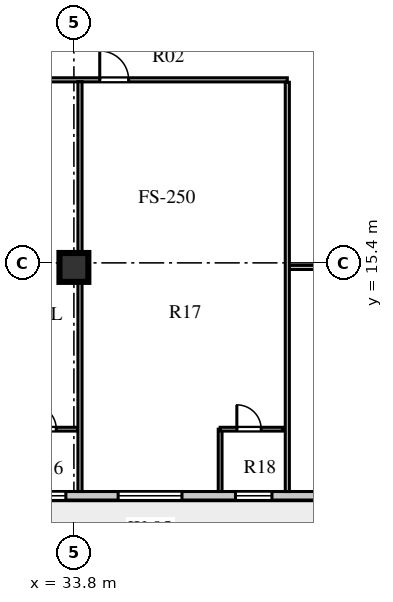
"""IFC4 building model, lengths in metres.
Left out: names, types, materials, properties, quantities, classifications, styles, units other than length and angle.
Written with IfcOpenShell. Run it as: python <this file> out.ifc"""

import sys

from ifc_helpers import new_model, si_unit, direction, frame, frame_2d, origin, origin_2d, place, context, subcontext, project, spatial, rectangle, extrude, element, fill, save


model = new_model("IFC4")
c1 = context("Model", 3, precision=1e-05, world=origin(), true_north=direction((0.0, 1.0)))
c2 = subcontext(c1, "Body", "Model", "MODEL_VIEW")
j1 = project(units=[si_unit("LENGTHUNIT", "METRE"), si_unit("PLANEANGLEUNIT", "RADIAN")], contexts=[c1])
p1 = place(None, origin())
s1 = spatial("IfcSite", under=j1, at=p1, CompositionType="ELEMENT")
p2 = place(p1, origin())
s2 = spatial("IfcBuilding", under=s1, at=p2, CompositionType="ELEMENT")
p3 = place(p2, frame((0.0, 0.0, 188.7)))
s3 = spatial("IfcBuildingStorey", under=s2, at=p3, CompositionType="ELEMENT", Elevation=188.7)
p4 = place(p3, frame((33.8, 15.25, 0.0), z_axis=(0.0, 0.0, 1.0), x_axis=(1.0, 0.0, 0.0)))
e1 = element("IfcColumn", 1, at=p4, inside=s3, PredefinedType="COLUMN", context=c2, shape_type="SweptSolid", body=[
    extrude(rectangle(XDim=0.95, YDim=0.95, at=origin_2d()), origin(), (0.0, 0.0, 1.0), 3.6),
])
p5 = place(p3, frame((13.05, 7.74, 0.0), z_axis=(0.0, 0.0, 1.0), x_axis=(1.0, 0.0, 0.0)))
e2 = element("IfcWall", 2, at=p5, inside=s3, PredefinedType="STANDARD", context=c2, shape_type="SweptSolid", body=[
    extrude(rectangle(XDim=32.5, YDim=0.28, at=frame_2d((16.25, 0.0))), origin(), (0.0, 0.0, 1.0), 3.6),
])
p6 = place(p5, frame((0.95, 0.0, 0.0)))
e3 = element("IfcOpeningElement", 3, at=p6, cuts=e2, PredefinedType="OPENING", context=c2, shape_type="SweptSolid", body=[
    extrude(rectangle(XDim=1.0, YDim=2.05, at=frame_2d((0.5, 1.025))), frame((0.0, 0.15, 0.0), z_axis=(0.0, -1.0, 0.0), x_axis=(1.0, 0.0, 0.0)), (0.0, 0.0, 1.0), 0.3),
])
p7 = place(p5, frame((6.28, 0.0, 0.8)))
e4 = element("IfcOpeningElement", 4, at=p7, cuts=e2, PredefinedType="OPENING", context=c2, shape_type="SweptSolid", body=[
    extrude(rectangle(XDim=1.5, YDim=2.0, at=frame_2d((0.75, 1.0))), frame((0.0, 0.15, 0.0), z_axis=(0.0, -1.0, 0.0), x_axis=(1.0, 0.0, 0.0)), (0.0, 0.0, 1.0), 0.3),
])
p8 = place(p5, frame((14.895, 0.0, 0.8)))
e5 = element("IfcOpeningElement", 5, at=p8, cuts=e2, PredefinedType="OPENING", context=c2, shape_type="SweptSolid", body=[
    extrude(rectangle(XDim=1.2, YDim=1.75, at=frame_2d((0.6, 0.875))), frame((0.0, 0.15, 0.0), z_axis=(0.0, -1.0, 0.0), x_axis=(1.0, 0.0, 0.0)), (0.0, 0.0, 1.0), 0.3),
])
p9 = place(p5, frame((19.285, 0.0, 0.8)))
e6 = element("IfcOpeningElement", 6, at=p9, cuts=e2, PredefinedType="OPENING", context=c2, shape_type="SweptSolid", body=[
    extrude(rectangle(XDim=1.2, YDim=1.75, at=frame_2d((0.6, 0.875))), frame((0.0, 0.15, 0.0), z_axis=(0.0, -1.0, 0.0), x_axis=(1.0, 0.0, 0.0)), (0.0, 0.0, 1.0), 0.3),
])
p10 = place(p5, frame((22.205, 0.0, 0.8)))
e7 = element("IfcOpeningElement", 7, at=p10, cuts=e2, PredefinedType="OPENING", context=c2, shape_type="SweptSolid", body=[
    extrude(rectangle(XDim=2.1, YDim=1.95, at=frame_2d((1.05, 0.975))), frame((0.0, 0.15, 0.0), z_axis=(0.0, -1.0, 0.0), x_axis=(1.0, 0.0, 0.0)), (0.0, 0.0, 1.0), 0.3),
])
p11 = place(p5, frame((26.065, 0.0, 0.8)))
e8 = element("IfcOpeningElement", 8, at=p11, cuts=e2, PredefinedType="OPENING", context=c2, shape_type="SweptSolid", body=[
    extrude(rectangle(XDim=1.2, YDim=1.75, at=frame_2d((0.6, 0.875))), frame((0.0, 0.15, 0.0), z_axis=(0.0, -1.0, 0.0), x_axis=(1.0, 0.0, 0.0)), (0.0, 0.0, 1.0), 0.3),
])
p12 = place(p5, frame((29.255, 0.0, 0.8)))
e9 = element("IfcOpeningElement", 9, at=p12, cuts=e2, PredefinedType="OPENING", context=c2, shape_type="SweptSolid", body=[
    extrude(rectangle(XDim=1.65, YDim=1.95, at=frame_2d((0.825, 0.975))), frame((0.0, 0.15, 0.0), z_axis=(0.0, -1.0, 0.0), x_axis=(1.0, 0.0, 0.0)), (0.0, 0.0, 1.0), 0.3),
])
p13 = place(p3, frame((25.22, 21.42, 0.0), z_axis=(0.0, 0.0, 1.0), x_axis=(1.0, 0.0, 0.0)))
e10 = element("IfcWall", 10, at=p13, inside=s3, PredefinedType="PARTITIONING", context=c2, shape_type="SweptSolid", body=[
    extrude(rectangle(XDim=15.6, YDim=0.135, at=frame_2d((7.8, 0.0))), origin(), (0.0, 0.0, 1.0), 3.25),
])
p14 = place(p13, frame((0.73, 0.0, 0.0)))
e11 = element("IfcOpeningElement", 11, at=p14, cuts=e10, PredefinedType="OPENING", context=c2, shape_type="SweptSolid", body=[
    extrude(rectangle(XDim=0.95, YDim=2.1, at=frame_2d((0.475, 1.05))), frame((0.0, 0.078, 0.0), z_axis=(0.0, -1.0, 0.0), x_axis=(1.0, 0.0, 0.0)), (0.0, 0.0, 1.0), 0.155),
])
p15 = place(p13, frame((9.43, 0.0, 0.0)))
e12 = element("IfcOpeningElement", 12, at=p15, cuts=e10, PredefinedType="OPENING", context=c2, shape_type="SweptSolid", body=[
    extrude(rectangle(XDim=0.95, YDim=2.1, at=frame_2d((0.475, 1.05))), frame((0.0, 0.078, 0.0), z_axis=(0.0, -1.0, 0.0), x_axis=(1.0, 0.0, 0.0)), (0.0, 0.0, 1.0), 0.155),
])
p16 = place(p3, frame((40.82, 15.25, 0.0), z_axis=(0.0, 0.0, 1.0), x_axis=(1.0, 0.0, 0.0)))
e13 = element("IfcWall", 13, at=p16, inside=s3, PredefinedType="PARTITIONING", context=c2, shape_type="SweptSolid", body=[
    extrude(rectangle(XDim=9.7, YDim=0.135, at=frame_2d((4.85, 0.0))), origin(), (0.0, 0.0, 1.0), 2.95),
])
p17 = place(p3, frame((40.82, 7.88, 0.0), z_axis=(0.0, 0.0, 1.0), x_axis=(0.0, 1.0, 0.0)))
e14 = element("IfcWall", 14, at=p17, inside=s3, PredefinedType="PARTITIONING", context=c2, shape_type="SweptSolid", body=[
    extrude(rectangle(XDim=13.46, YDim=0.135, at=frame_2d((6.73, 0.0))), origin(), (0.0, 0.0, 1.0), 3.6),
])
p18 = place(p3, frame((31.87, 9.93, 0.0), z_axis=(0.0, 0.0, 1.0), x_axis=(1.0, 0.0, 0.0)))
e15 = element("IfcWall", 15, at=p18, inside=s3, PredefinedType="PLUMBINGWALL", context=c2, shape_type="SweptSolid", body=[
    extrude(rectangle(XDim=2.05, YDim=0.125, at=frame_2d((1.025, 0.0))), origin(), (0.0, 0.0, 1.0), 3.6),
])
p19 = place(p18, frame((0.55, 0.0, 0.0)))
e16 = element("IfcOpeningElement", 16, at=p19, cuts=e15, PredefinedType="OPENING", context=c2, shape_type="SweptSolid", body=[
    extrude(rectangle(XDim=0.8, YDim=2.05, at=frame_2d((0.4, 1.025))), frame((0.0, 0.073, 0.0), z_axis=(0.0, -1.0, 0.0), x_axis=(1.0, 0.0, 0.0)), (0.0, 0.0, 1.0), 0.145),
])
p20 = place(p3, frame((34.0, 7.88, 0.0), z_axis=(0.0, 0.0, 1.0), x_axis=(0.0, 1.0, 0.0)))
e17 = element("IfcWall", 17, at=p20, inside=s3, PredefinedType="PARTITIONING", context=c2, shape_type="SweptSolid", body=[
    extrude(rectangle(XDim=13.48, YDim=0.135, at=frame_2d((6.74, 0.0))), origin(), (0.0, 0.0, 1.0), 2.95),
])
p21 = place(p3, frame((38.61, 7.88, 0.0), z_axis=(0.0, 0.0, 1.0), x_axis=(0.0, 1.0, 0.0)))
e18 = element("IfcWall", 18, at=p21, inside=s3, PredefinedType="PLUMBINGWALL", context=c2, shape_type="SweptSolid", body=[
    extrude(rectangle(XDim=2.05, YDim=0.125, at=frame_2d((1.025, 0.0))), origin(), (0.0, 0.0, 1.0), 3.6),
])
p22 = place(p3, frame((38.61, 9.93, 0.0), z_axis=(0.0, 0.0, 1.0), x_axis=(1.0, 0.0, 0.0)))
e19 = element("IfcWall", 19, at=p22, inside=s3, PredefinedType="PLUMBINGWALL", context=c2, shape_type="SweptSolid", body=[
    extrude(rectangle(XDim=2.05, YDim=0.125, at=frame_2d((1.025, 0.0))), origin(), (0.0, 0.0, 1.0), 3.6),
])
p23 = place(p22, frame((0.55, 0.0, 0.0)))
e20 = element("IfcOpeningElement", 20, at=p23, cuts=e19, PredefinedType="OPENING", context=c2, shape_type="SweptSolid", body=[
    extrude(rectangle(XDim=0.8, YDim=2.05, at=frame_2d((0.4, 1.025))), frame((0.0, 0.073, 0.0), z_axis=(0.0, -1.0, 0.0), x_axis=(1.0, 0.0, 0.0)), (0.0, 0.0, 1.0), 0.145),
])
p24 = place(p9, origin())
e21 = element("IfcWindow", 21, at=p24, inside=s3, PartitioningType="SINGLE_PANEL", PredefinedType="WINDOW", context=c2, shape_type="SweptSolid", body=[
    extrude(rectangle(XDim=1.2, YDim=1.75, at=frame_2d((0.6, 0.875))), frame((0.0, 0.03, 0.0), z_axis=(0.0, -1.0, 0.0), x_axis=(1.0, 0.0, 0.0)), (0.0, 0.0, 1.0), 0.06),
])
fill(e6, e21)
p25 = place(p10, origin())
e22 = element("IfcWindow", 22, at=p25, inside=s3, PartitioningType="SINGLE_PANEL", PredefinedType="WINDOW", context=c2, shape_type="SweptSolid", body=[
    extrude(rectangle(XDim=2.1, YDim=1.95, at=frame_2d((1.05, 0.975))), frame((0.0, 0.03, 0.0), z_axis=(0.0, -1.0, 0.0), x_axis=(1.0, 0.0, 0.0)), (0.0, 0.0, 1.0), 0.06),
])
fill(e7, e22)
p26 = place(p11, origin())
e23 = element("IfcWindow", 23, at=p26, inside=s3, PartitioningType="SINGLE_PANEL", PredefinedType="WINDOW", context=c2, shape_type="SweptSolid", body=[
    extrude(rectangle(XDim=1.2, YDim=1.75, at=frame_2d((0.6, 0.875))), frame((0.0, 0.03, 0.0), z_axis=(0.0, -1.0, 0.0), x_axis=(1.0, 0.0, 0.0)), (0.0, 0.0, 1.0), 0.06),
])
fill(e8, e23)
p27 = place(p19, origin())
e24 = element("IfcDoor", 24, at=p27, inside=s3, OperationType="SINGLE_SWING_LEFT", PredefinedType="DOOR", context=c2, shape_type="SweptSolid", body=[
    extrude(rectangle(XDim=0.8, YDim=2.05, at=frame_2d((0.4, 1.025))), frame((0.0, 0.025, 0.0), z_axis=(0.0, -1.0, 0.0), x_axis=(1.0, 0.0, 0.0)), (0.0, 0.0, 1.0), 0.05),
])
fill(e16, e24)
p28 = place(p15, frame((0.95, 0.0, 0.0), z_axis=(0.0, 0.0, 1.0), x_axis=(-1.0, 0.0, 0.0)))
e25 = element("IfcDoor", 25, at=p28, inside=s3, OperationType="SINGLE_SWING_RIGHT", PredefinedType="DOOR", context=c2, shape_type="SweptSolid", body=[
    extrude(rectangle(XDim=0.95, YDim=2.1, at=frame_2d((0.475, 1.05))), frame((0.0, 0.025, 0.0), z_axis=(0.0, -1.0, 0.0), x_axis=(1.0, 0.0, 0.0)), (0.0, 0.0, 1.0), 0.05),
])
fill(e12, e25)
p29 = place(p23, origin())
e26 = element("IfcDoor", 26, at=p29, inside=s3, OperationType="SINGLE_SWING_LEFT", PredefinedType="DOOR", context=c2, shape_type="SweptSolid", body=[
    extrude(rectangle(XDim=0.8, YDim=2.05, at=frame_2d((0.4, 1.025))), frame((0.0, 0.025, 0.0), z_axis=(0.0, -1.0, 0.0), x_axis=(1.0, 0.0, 0.0)), (0.0, 0.0, 1.0), 0.05),
])
fill(e20, e26)
save(model, sys.argv[1])
